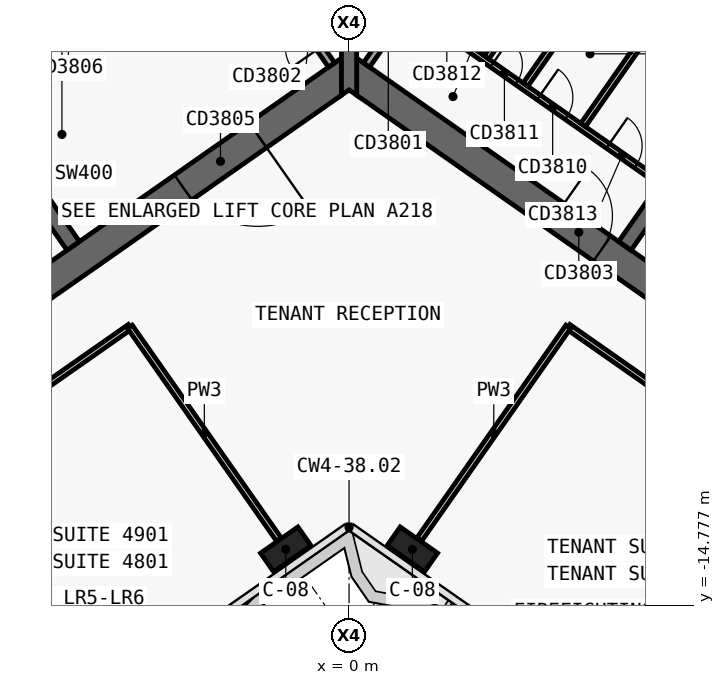
"""IFC4 building model, lengths in metres.
Left out: names, types, materials, properties, quantities, classifications, styles, units other than length and angle.
Written with IfcOpenShell. Run it as: python <this file> out.ifc"""

import sys

from ifc_helpers import new_model, si_unit, direction, frame, frame_2d, origin, origin_2d, place, context, subcontext, project, spatial, polyline, rectangle, outline, extrude, element, fill, save


model = new_model("IFC4")
c1 = context("Model", 3, precision=1e-05, world=origin(), true_north=direction((0.0, 1.0)))
c2 = subcontext(c1, "Body", "Model", "MODEL_VIEW")
j1 = project(units=[si_unit("LENGTHUNIT", "METRE"), si_unit("PLANEANGLEUNIT", "RADIAN")], contexts=[c1])
p1 = place(None, origin())
s1 = spatial("IfcSite", under=j1, at=p1, CompositionType="ELEMENT")
p2 = place(p1, origin())
s2 = spatial("IfcBuilding", under=s1, at=p2, CompositionType="ELEMENT")
p3 = place(p2, frame((0.0, 0.0, 206.1)))
s3 = spatial("IfcBuildingStorey", under=s2, at=p3, CompositionType="ELEMENT", Elevation=206.1)
p4 = place(p3, frame((0.029, 11.984, 0.0), z_axis=(0.0, 0.0, 1.0), x_axis=(-0.819151382952, -0.573577380837, 0.0)))
e1 = element("IfcWall", 1, at=p4, inside=s3, PredefinedType="SHEAR", context=c2, shape_type="SweptSolid", body=[
    extrude(outline(polyline([(33.898, 0.4), (0.56, 0.4), (-0.0, -0.4), (33.898, -0.4), (33.898, 0.4)])), origin(), (0.0, 0.0, 1.0), 3.9),
])
p5 = place(p3, frame((0.029, -0.712, 0.0), z_axis=(0.0, 0.0, 1.0), x_axis=(-0.819151758019, -0.573576845187, 0.0)))
e2 = element("IfcWall", 2, at=p5, inside=s3, PredefinedType="SHEAR", context=c2, shape_type="SweptSolid", body=[
    extrude(outline(polyline([(26.616, 0.4), (0.56, 0.4), (-0.0, -0.4), (26.616, -0.4), (26.616, 0.4)])), origin(), (0.0, 0.0, 1.0), 3.9),
])
p6 = place(p5, frame((2.966, 0.0, 0.0)))
e3 = element("IfcOpeningElement", 3, at=p6, cuts=e2, PredefinedType="OPENING", context=c2, shape_type="SweptSolid", body=[
    extrude(rectangle(XDim=2.4, YDim=2.1, at=frame_2d((1.2, 1.05))), frame((0.0, 0.41, 0.0), z_axis=(0.0, -1.0, 0.0), x_axis=(1.0, 0.0, 0.0)), (0.0, 0.0, 1.0), 0.82),
])
p7 = place(p5, frame((11.916, 0.0, 0.0)))
e4 = element("IfcOpeningElement", 4, at=p7, cuts=e2, PredefinedType="OPENING", context=c2, shape_type="SweptSolid", body=[
    extrude(rectangle(XDim=2.4, YDim=2.1, at=frame_2d((1.2, 1.05))), frame((0.0, 0.41, 0.0), z_axis=(0.0, -1.0, 0.0), x_axis=(1.0, 0.0, 0.0)), (0.0, 0.0, 1.0), 0.82),
])
p8 = place(p3, frame((-7.258, -5.326, 0.0), z_axis=(0.0, 0.0, 1.0), x_axis=(-0.573540709186, 0.819177059558, 0.0)))
e5 = element("IfcWall", 5, at=p8, inside=s3, PredefinedType="SHEAR", context=c2, shape_type="SweptSolid", body=[
    extrude(outline(polyline([(4.6, 0.2), (-0.0, 0.2), (-0.0, -0.2), (4.6, -0.2), (4.6, 0.2)])), origin(), (0.0, 0.0, 1.0), 3.9),
])
p9 = place(p3, frame((-2.638, 3.768, 0.0), z_axis=(0.0, 0.0, 1.0), x_axis=(-0.81915267502, -0.573575535572, 0.0)))
e6 = element("IfcWall", 6, at=p9, inside=s3, PredefinedType="SHEAR", context=c2, shape_type="SweptSolid", body=[
    extrude(outline(polyline([(26.2, 0.2), (0.0, 0.2), (0.0, -0.2), (26.2, -0.2), (26.2, 0.2)])), origin(), (0.0, 0.0, 1.0), 3.9),
])
p10 = place(p9, frame((1.169, 0.0, 0.0)))
e7 = element("IfcOpeningElement", 7, at=p10, cuts=e6, PredefinedType="OPENING", context=c2, shape_type="SweptSolid", body=[
    extrude(rectangle(XDim=1.1, YDim=2.1, at=frame_2d((0.55, 1.05))), frame((0.0, 0.21, 0.0), z_axis=(0.0, -1.0, 0.0), x_axis=(1.0, 0.0, 0.0)), (0.0, 0.0, 1.0), 0.42),
])
p11 = place(p9, frame((3.206, 0.0, 0.0)))
e8 = element("IfcOpeningElement", 8, at=p11, cuts=e6, PredefinedType="OPENING", context=c2, shape_type="SweptSolid", body=[
    extrude(rectangle(XDim=1.1, YDim=2.1, at=frame_2d((0.55, 1.05))), frame((0.0, 0.21, 0.0), z_axis=(0.0, -1.0, 0.0), x_axis=(1.0, 0.0, 0.0)), (0.0, 0.0, 1.0), 0.42),
])
p12 = place(p9, frame((5.244, 0.0, 0.0)))
e9 = element("IfcOpeningElement", 9, at=p12, cuts=e6, PredefinedType="OPENING", context=c2, shape_type="SweptSolid", body=[
    extrude(rectangle(XDim=1.1, YDim=2.1, at=frame_2d((0.55, 1.05))), frame((0.0, 0.21, 0.0), z_axis=(0.0, -1.0, 0.0), x_axis=(1.0, 0.0, 0.0)), (0.0, 0.0, 1.0), 0.42),
])
p13 = place(p9, frame((7.281, 0.0, 0.0)))
e10 = element("IfcOpeningElement", 10, at=p13, cuts=e6, PredefinedType="OPENING", context=c2, shape_type="SweptSolid", body=[
    extrude(rectangle(XDim=1.1, YDim=2.1, at=frame_2d((0.55, 1.05))), frame((0.0, 0.21, 0.0), z_axis=(0.0, -1.0, 0.0), x_axis=(1.0, 0.0, 0.0)), (0.0, 0.0, 1.0), 0.42),
])
p14 = place(p9, frame((9.688, 0.0, 0.0)))
e11 = element("IfcOpeningElement", 11, at=p14, cuts=e6, PredefinedType="OPENING", context=c2, shape_type="SweptSolid", body=[
    extrude(rectangle(XDim=1.1, YDim=2.1, at=frame_2d((0.55, 1.05))), frame((0.0, 0.21, 0.0), z_axis=(0.0, -1.0, 0.0), x_axis=(1.0, 0.0, 0.0)), (0.0, 0.0, 1.0), 0.42),
])
p15 = place(p9, frame((11.863, 0.0, 0.0)))
e12 = element("IfcOpeningElement", 12, at=p15, cuts=e6, PredefinedType="OPENING", context=c2, shape_type="SweptSolid", body=[
    extrude(rectangle(XDim=1.1, YDim=2.1, at=frame_2d((0.55, 1.05))), frame((0.0, 0.21, 0.0), z_axis=(0.0, -1.0, 0.0), x_axis=(1.0, 0.0, 0.0)), (0.0, 0.0, 1.0), 0.42),
])
p16 = place(p9, frame((14.552, 0.0, 0.0)))
e13 = element("IfcOpeningElement", 13, at=p16, cuts=e6, PredefinedType="OPENING", context=c2, shape_type="SweptSolid", body=[
    extrude(rectangle(XDim=1.0, YDim=2.1, at=frame_2d((0.5, 1.05))), frame((0.0, 0.21, 0.0), z_axis=(0.0, -1.0, 0.0), x_axis=(1.0, 0.0, 0.0)), (0.0, 0.0, 1.0), 0.42),
])
p17 = place(p9, frame((16.627, 0.0, 0.0)))
e14 = element("IfcOpeningElement", 14, at=p17, cuts=e6, PredefinedType="OPENING", context=c2, shape_type="SweptSolid", body=[
    extrude(rectangle(XDim=1.0, YDim=2.1, at=frame_2d((0.5, 1.05))), frame((0.0, 0.21, 0.0), z_axis=(0.0, -1.0, 0.0), x_axis=(1.0, 0.0, 0.0)), (0.0, 0.0, 1.0), 0.42),
])
p18 = place(p3, frame((-0.029, 11.984, 0.0), z_axis=(0.0, 0.0, 1.0), x_axis=(0.819151382952, -0.573577380837, 0.0)))
e15 = element("IfcWall", 15, at=p18, inside=s3, PredefinedType="SHEAR", context=c2, shape_type="SweptSolid", body=[
    extrude(outline(polyline([(33.898, 0.4), (-0.0, 0.4), (0.56, -0.4), (33.898, -0.4), (33.898, 0.4)])), origin(), (0.0, 0.0, 1.0), 3.9),
])
p19 = place(p3, frame((-0.029, -0.712, 0.0), z_axis=(0.0, 0.0, 1.0), x_axis=(0.819151758019, -0.573576845187, 0.0)))
e16 = element("IfcWall", 16, at=p19, inside=s3, PredefinedType="SHEAR", context=c2, shape_type="SweptSolid", body=[
    extrude(outline(polyline([(26.616, 0.4), (-0.0, 0.4), (0.56, -0.4), (26.616, -0.4), (26.616, 0.4)])), origin(), (0.0, 0.0, 1.0), 3.9),
])
p20 = place(p19, frame((6.666, 0.0, 0.0)))
e17 = element("IfcOpeningElement", 17, at=p20, cuts=e16, PredefinedType="OPENING", context=c2, shape_type="SweptSolid", body=[
    extrude(rectangle(XDim=1.5, YDim=2.1, at=frame_2d((0.75, 1.05))), frame((0.0, 0.41, 0.0), z_axis=(0.0, -1.0, 0.0), x_axis=(1.0, 0.0, 0.0)), (0.0, 0.0, 1.0), 0.82),
])
p21 = place(p19, frame((12.366, 0.0, 0.0)))
e18 = element("IfcOpeningElement", 18, at=p21, cuts=e16, PredefinedType="OPENING", context=c2, shape_type="SweptSolid", body=[
    extrude(rectangle(XDim=1.5, YDim=2.1, at=frame_2d((0.75, 1.05))), frame((0.0, 0.41, 0.0), z_axis=(0.0, -1.0, 0.0), x_axis=(1.0, 0.0, 0.0)), (0.0, 0.0, 1.0), 0.82),
])
p22 = place(p3, frame((7.258, -5.326, 0.0), z_axis=(0.0, 0.0, 1.0), x_axis=(0.573540709186, 0.819177059558, 0.0)))
e19 = element("IfcWall", 19, at=p22, inside=s3, PredefinedType="SHEAR", context=c2, shape_type="SweptSolid", body=[
    extrude(outline(polyline([(-0.0, 0.2), (-0.0, -0.2), (4.6, -0.2), (4.6, 0.2), (-0.0, 0.2)])), origin(), (0.0, 0.0, 1.0), 3.9),
])
p23 = place(p3, frame((2.638, 3.768, 0.0), z_axis=(0.0, 0.0, 1.0), x_axis=(0.81915267502, -0.573575535572, 0.0)))
e20 = element("IfcWall", 20, at=p23, inside=s3, PredefinedType="SHEAR", context=c2, shape_type="SweptSolid", body=[
    extrude(outline(polyline([(0.0, 0.2), (0.0, -0.2), (26.2, -0.2), (26.2, 0.2), (0.0, 0.2)])), origin(), (0.0, 0.0, 1.0), 3.9),
])
p24 = place(p23, frame((9.637, 0.0, 0.0)))
e21 = element("IfcOpeningElement", 21, at=p24, cuts=e20, PredefinedType="OPENING", context=c2, shape_type="SweptSolid", body=[
    extrude(rectangle(XDim=1.2, YDim=2.1, at=frame_2d((0.6, 1.05))), frame((0.0, 0.21, 0.0), z_axis=(0.0, -1.0, 0.0), x_axis=(1.0, 0.0, 0.0)), (0.0, 0.0, 1.0), 0.42),
])
p25 = place(p23, frame((11.812, 0.0, 0.0)))
e22 = element("IfcOpeningElement", 22, at=p25, cuts=e20, PredefinedType="OPENING", context=c2, shape_type="SweptSolid", body=[
    extrude(rectangle(XDim=1.2, YDim=2.1, at=frame_2d((0.6, 1.05))), frame((0.0, 0.21, 0.0), z_axis=(0.0, -1.0, 0.0), x_axis=(1.0, 0.0, 0.0)), (0.0, 0.0, 1.0), 0.42),
])
p26 = place(p23, frame((13.988, 0.0, 0.0)))
e23 = element("IfcOpeningElement", 23, at=p26, cuts=e20, PredefinedType="OPENING", context=c2, shape_type="SweptSolid", body=[
    extrude(rectangle(XDim=1.2, YDim=2.1, at=frame_2d((0.6, 1.05))), frame((0.0, 0.21, 0.0), z_axis=(0.0, -1.0, 0.0), x_axis=(1.0, 0.0, 0.0)), (0.0, 0.0, 1.0), 0.42),
])
p27 = place(p23, frame((16.262, 0.0, 0.0)))
e24 = element("IfcOpeningElement", 24, at=p27, cuts=e20, PredefinedType="OPENING", context=c2, shape_type="SweptSolid", body=[
    extrude(rectangle(XDim=1.0, YDim=2.1, at=frame_2d((0.5, 1.05))), frame((0.0, 0.21, 0.0), z_axis=(0.0, -1.0, 0.0), x_axis=(1.0, 0.0, 0.0)), (0.0, 0.0, 1.0), 0.42),
])
p28 = place(p3, frame((0.0, -1.361, 0.0), z_axis=(0.0, 0.0, 1.0), x_axis=(0.0, 1.0, 0.0)))
e25 = element("IfcWall", 25, at=p28, inside=s3, PredefinedType="SHEAR", context=c2, shape_type="SweptSolid", body=[
    extrude(outline(polyline([(0.0, -0.2), (0.14, -0.2), (1.075, -0.2), (12.696, -0.2), (13.813, -0.2), (13.893, -0.2), (13.933, -0.172), (13.813, 0.0), (13.933, 0.172), (13.893, 0.2), (13.813, 0.2), (12.696, 0.2), (1.075, 0.2), (0.14, 0.2), (0.0, 0.2), (0.14, 0.0), (0.0, -0.2)])), origin(), (0.0, 0.0, 1.0), 3.9),
])
for number, where, z_axis, x_axis in (
    (26, (-1.665, -13.313, 0.0), (0.0, 0.0, 1.0), (-0.819, -0.574, 0.0)),
    (27, (1.665, -13.313, 0.0), (0.0, 0.0, 1.0), (0.819, -0.574, 0.0)),
):
    element("IfcColumn", number, at=place(p3, frame(where, z_axis=z_axis, x_axis=x_axis)), inside=s3, PredefinedType="COLUMN", context=c2, shape_type="SweptSolid", body=[
        extrude(rectangle(XDim=1.2, YDim=0.6, at=origin_2d()), origin(), (0.0, 0.0, 1.0), 3.9),
    ])
p29 = place(p3, frame((1.63, 0.934, 0.0), z_axis=(0.0, 0.0, 1.0), x_axis=(0.819165963305, -0.573556557423, 0.0)))
e28 = element("IfcWall", 28, at=p29, inside=s3, PredefinedType="PARTITIONING", context=c2, shape_type="SweptSolid", body=[
    extrude(rectangle(XDim=8.0, YDim=0.15, at=frame_2d((4.0, 0.0))), origin(), (0.0, 0.0, 1.0), 3.62),
])
p30 = place(p29, frame((0.7, 0.0, 0.0)))
e29 = element("IfcOpeningElement", 29, at=p30, cuts=e28, PredefinedType="OPENING", context=c2, shape_type="SweptSolid", body=[
    extrude(rectangle(XDim=0.9, YDim=2.1, at=frame_2d((0.45, 1.05))), frame((0.0, 0.085, 0.0), z_axis=(0.0, -1.0, 0.0), x_axis=(1.0, 0.0, 0.0)), (0.0, 0.0, 1.0), 0.17),
])
p31 = place(p29, frame((2.6, 0.0, 0.0)))
e30 = element("IfcOpeningElement", 30, at=p31, cuts=e28, PredefinedType="OPENING", context=c2, shape_type="SweptSolid", body=[
    extrude(rectangle(XDim=0.8, YDim=2.1, at=frame_2d((0.4, 1.05))), frame((0.0, 0.085, 0.0), z_axis=(0.0, -1.0, 0.0), x_axis=(1.0, 0.0, 0.0)), (0.0, 0.0, 1.0), 0.17),
])
p32 = place(p29, frame((4.1, 0.0, 0.0)))
e31 = element("IfcOpeningElement", 31, at=p32, cuts=e28, PredefinedType="OPENING", context=c2, shape_type="SweptSolid", body=[
    extrude(rectangle(XDim=0.9, YDim=2.1, at=frame_2d((0.45, 1.05))), frame((0.0, 0.085, 0.0), z_axis=(0.0, -1.0, 0.0), x_axis=(1.0, 0.0, 0.0)), (0.0, 0.0, 1.0), 0.17),
])
p33 = place(p29, frame((6.325, 0.0, 0.0)))
e32 = element("IfcOpeningElement", 32, at=p33, cuts=e28, PredefinedType="OPENING", context=c2, shape_type="SweptSolid", body=[
    extrude(rectangle(XDim=0.9, YDim=2.1, at=frame_2d((0.45, 1.05))), frame((0.0, 0.085, 0.0), z_axis=(0.0, -1.0, 0.0), x_axis=(1.0, 0.0, 0.0)), (0.0, 0.0, 1.0), 0.17),
])
for number, where, z_axis, x_axis in (
    (33, (3.619, -0.367, 0.0), (0.0, 0.0, 1.0), (0.574, 0.819, 0.0)),
    (34, (4.643, -1.084, 0.0), (0.0, 0.0, 1.0), (0.574, 0.819, 0.0)),
    (35, (6.158, -2.145, 0.0), (0.0, 0.0, 1.0), (0.574, 0.819, 0.0)),
):
    element("IfcWall", number, at=place(p3, frame(where, z_axis=z_axis, x_axis=x_axis)), inside=s3, PredefinedType="PARTITIONING", context=c2, shape_type="SweptSolid", body=[
        extrude(rectangle(XDim=2.625, YDim=0.15, at=frame_2d((1.312, 0.0))), origin(), (0.0, 0.0, 1.0), 3.62),
    ])
p34 = place(p3, frame((-0.459, -0.565, 0.0), z_axis=(0.0, 0.0, 1.0), x_axis=(-0.573576324356, 0.819152122709, 0.0)))
e36 = element("IfcWall", 36, at=p34, inside=s3, PredefinedType="SOLIDWALL", context=c2, shape_type="SweptSolid", body=[
    extrude(rectangle(XDim=4.6, YDim=0.2, at=frame_2d((2.3, 0.0))), origin(), (0.0, 0.0, 1.0), 3.62),
])
p35 = place(p34, frame((0.55, 0.0, 0.0)))
e37 = element("IfcOpeningElement", 37, at=p35, cuts=e36, PredefinedType="OPENING", context=c2, shape_type="SweptSolid", body=[
    extrude(rectangle(XDim=0.9, YDim=2.1, at=frame_2d((0.45, 1.05))), frame((0.0, 0.11, 0.0), z_axis=(0.0, -1.0, 0.0), x_axis=(1.0, 0.0, 0.0)), (0.0, 0.0, 1.0), 0.22),
])
p36 = place(p3, frame((0.459, -0.565, 0.0), z_axis=(0.0, 0.0, 1.0), x_axis=(0.573576324356, 0.819152122709, 0.0)))
e38 = element("IfcWall", 38, at=p36, inside=s3, PredefinedType="SOLIDWALL", context=c2, shape_type="SweptSolid", body=[
    extrude(rectangle(XDim=4.6, YDim=0.2, at=frame_2d((2.3, 0.0))), origin(), (0.0, 0.0, 1.0), 3.62),
])
p37 = place(p36, frame((0.55, 0.0, 0.0)))
e39 = element("IfcOpeningElement", 39, at=p37, cuts=e38, PredefinedType="OPENING", context=c2, shape_type="SweptSolid", body=[
    extrude(rectangle(XDim=0.9, YDim=2.1, at=frame_2d((0.45, 1.05))), frame((0.0, 0.11, 0.0), z_axis=(0.0, -1.0, 0.0), x_axis=(1.0, 0.0, 0.0)), (0.0, 0.0, 1.0), 0.22),
])
p38 = place(p3, frame((14.369, -13.479, 0.0), z_axis=(0.0, 0.0, 1.0), x_axis=(-0.819154371039, 0.573573113393, 0.0)))
e40 = element("IfcWall", 40, at=p38, inside=s3, PredefinedType="PARTITIONING", context=c2, shape_type="SweptSolid", body=[
    extrude(rectangle(XDim=10.502, YDim=0.15, at=frame_2d((5.251, 0.0))), origin(), (0.0, 0.0, 1.0), 3.0),
])
p39 = place(p38, frame((4.451, 0.0, 0.0)))
e41 = element("IfcOpeningElement", 41, at=p39, cuts=e40, PredefinedType="OPENING", context=c2, shape_type="SweptSolid", body=[
    extrude(rectangle(XDim=1.6, YDim=2.1, at=frame_2d((0.8, 1.05))), frame((0.0, 0.085, 0.0), z_axis=(0.0, -1.0, 0.0), x_axis=(1.0, 0.0, 0.0)), (0.0, 0.0, 1.0), 0.17),
])
p40 = place(p3, frame((-5.766, -7.456, 0.0), z_axis=(0.0, 0.0, 1.0), x_axis=(-0.81915291695, -0.57357519006, 0.0)))
e42 = element("IfcWall", 42, at=p40, inside=s3, PredefinedType="PARTITIONING", context=c2, shape_type="SweptSolid", body=[
    extrude(rectangle(XDim=9.002, YDim=0.15, at=frame_2d((4.501, 0.0))), origin(), (0.0, 0.0, 1.0), 3.0),
])
p41 = place(p40, frame((3.701, 0.0, 0.0)))
e43 = element("IfcOpeningElement", 43, at=p41, cuts=e42, PredefinedType="OPENING", context=c2, shape_type="SweptSolid", body=[
    extrude(rectangle(XDim=1.6, YDim=2.1, at=frame_2d((0.8, 1.05))), frame((0.0, 0.085, 0.0), z_axis=(0.0, -1.0, 0.0), x_axis=(1.0, 0.0, 0.0)), (0.0, 0.0, 1.0), 0.17),
])
p42 = place(p3, frame((1.849, -13.051, 0.0), z_axis=(0.0, 0.0, 1.0), x_axis=(0.573577493031, 0.819151304393, 0.0)))
e44 = element("IfcWall", 44, at=p42, inside=s3, PredefinedType="PARTITIONING", context=c2, shape_type="SweptSolid", body=[
    extrude(rectangle(XDim=6.83, YDim=0.15, at=frame_2d((3.415, 0.0))), origin(), (0.0, 0.0, 1.0), 3.0),
])
p43 = place(p3, frame((-1.849, -13.051, 0.0), z_axis=(0.0, 0.0, 1.0), x_axis=(-0.57357985571, 0.819149650018, 0.0)))
e45 = element("IfcWall", 45, at=p43, inside=s3, PredefinedType="PARTITIONING", context=c2, shape_type="SweptSolid", body=[
    extrude(rectangle(XDim=6.832, YDim=0.15, at=frame_2d((3.416, 0.0))), origin(), (0.0, 0.0, 1.0), 3.0),
])
p44 = place(p6, origin())
e46 = element("IfcDoor", 46, at=p44, inside=s3, OperationType="DOUBLE_DOOR_SINGLE_SWING", PredefinedType="DOOR", context=c2, shape_type="SweptSolid", body=[
    extrude(rectangle(XDim=2.4, YDim=2.1, at=frame_2d((1.2, 1.05))), frame((0.0, 0.025, 0.0), z_axis=(0.0, -1.0, 0.0), x_axis=(1.0, 0.0, 0.0)), (0.0, 0.0, 1.0), 0.05),
])
fill(e3, e46)
p45 = place(p31, origin())
e47 = element("IfcDoor", 47, at=p45, inside=s3, OperationType="SINGLE_SWING_RIGHT", PredefinedType="DOOR", context=c2, shape_type="SweptSolid", body=[
    extrude(rectangle(XDim=0.8, YDim=2.1, at=frame_2d((0.4, 1.05))), frame((0.0, 0.025, 0.0), z_axis=(0.0, -1.0, 0.0), x_axis=(1.0, 0.0, 0.0)), (0.0, 0.0, 1.0), 0.05),
])
fill(e30, e47)
p46 = place(p32, origin())
e48 = element("IfcDoor", 48, at=p46, inside=s3, OperationType="SINGLE_SWING_RIGHT", PredefinedType="DOOR", context=c2, shape_type="SweptSolid", body=[
    extrude(rectangle(XDim=0.9, YDim=2.1, at=frame_2d((0.45, 1.05))), frame((0.0, 0.025, 0.0), z_axis=(0.0, -1.0, 0.0), x_axis=(1.0, 0.0, 0.0)), (0.0, 0.0, 1.0), 0.05),
])
fill(e31, e48)
p47 = place(p33, origin())
e49 = element("IfcDoor", 49, at=p47, inside=s3, OperationType="SINGLE_SWING_RIGHT", PredefinedType="DOOR", context=c2, shape_type="SweptSolid", body=[
    extrude(rectangle(XDim=0.9, YDim=2.1, at=frame_2d((0.45, 1.05))), frame((0.0, 0.025, 0.0), z_axis=(0.0, -1.0, 0.0), x_axis=(1.0, 0.0, 0.0)), (0.0, 0.0, 1.0), 0.05),
])
fill(e32, e49)
p48 = place(p20, origin())
e50 = element("IfcDoor", 50, at=p48, inside=s3, OperationType="SINGLE_SWING_RIGHT", PredefinedType="DOOR", context=c2, shape_type="SweptSolid", body=[
    extrude(rectangle(XDim=1.5, YDim=2.1, at=frame_2d((0.75, 1.05))), frame((0.0, 0.025, 0.0), z_axis=(0.0, -1.0, 0.0), x_axis=(1.0, 0.0, 0.0)), (0.0, 0.0, 1.0), 0.05),
])
fill(e17, e50)
save(model, sys.argv[1])
